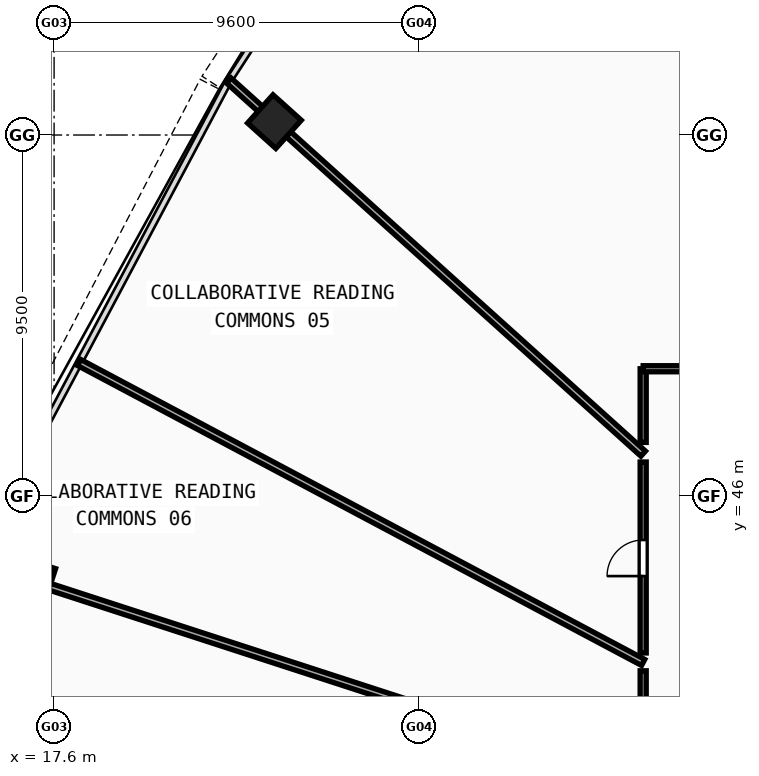
"""IFC4 building model, lengths in metres.
Left out: names, types, materials, properties, quantities, classifications, styles, units other than length and angle.
Written with IfcOpenShell. Run it as: python <this file> out.ifc"""

import sys

from ifc_helpers import new_model, si_unit, direction, frame, frame_2d, origin, origin_with_axes, origin_2d, place, context, subcontext, project, spatial, rectangle, hollow_rectangle, extrude, source, transform, mapped, element, fill, save


model = new_model("IFC4")
c1 = context("Model", 3, precision=1e-05, world=origin(), true_north=direction((0.0, 1.0)))
c2 = subcontext(c1, "Body", "Model", "MODEL_VIEW")
j1 = project(units=[si_unit("LENGTHUNIT", "METRE"), si_unit("PLANEANGLEUNIT", "RADIAN")], contexts=[c1])
p1 = place(None, origin())
s1 = spatial("IfcSite", under=j1, at=p1, CompositionType="ELEMENT")
p2 = place(p1, origin())
s2 = spatial("IfcBuilding", under=s1, at=p2, CompositionType="ELEMENT")
p3 = place(p2, frame((0.0, 0.0, 103.98)))
s3 = spatial("IfcBuildingStorey", under=s2, at=p3, CompositionType="ELEMENT", Elevation=103.98)
m1 = source(origin(), c2, "Body", "SweptSolid", [
    extrude(hollow_rectangle(XDim=1.0, YDim=1.0, WallThickness=0.042, at=origin_2d()), origin(), (0.0, 0.0, 1.0), 3.8),
])
for number, where, z_axis, x_axis in (
    (1, (23.397, 55.852, -0.26), (0.0, 0.0, 1.0), (-0.669, -0.743, 0.0)),
    (2, (17.009, 43.77, -0.26), (0.0, 0.0, 1.0), (-0.309, -0.951, 0.0)),
):
    element("IfcColumn", number, at=place(p3, frame(where, z_axis=z_axis, x_axis=x_axis)), inside=s3, PredefinedType="COLUMN", context=c2, shape_type="MappedRepresentation", body=[
        mapped(m1, transform((0.0, 0.0, 0.0), scale=1.0)),
    ])
p4 = place(p3, frame((33.1, 47.116, 0.0), z_axis=(0.0, 0.0, 1.0), x_axis=(-0.7431435128, 0.669132064232, 0.0)))
e3 = element("IfcWall", 3, at=p4, inside=s3, PredefinedType="PARTITIONING", context=c2, shape_type="SweptSolid", body=[
    extrude(rectangle(XDim=14.669, YDim=0.18, at=frame_2d((7.334, 0.0))), origin(), (0.0, 0.0, 1.0), 2.84),
])
p5 = place(p3, frame((33.1, 41.623, 0.0), z_axis=(0.0, 0.0, 1.0), x_axis=(-0.88295130371, 0.469464583624, 0.0)))
e4 = element("IfcWall", 4, at=p5, inside=s3, PredefinedType="PARTITIONING", context=c2, shape_type="SweptSolid", body=[
    extrude(rectangle(XDim=16.809, YDim=0.18, at=frame_2d((8.404, 0.0))), origin(), (0.0, 0.0, 1.0), 2.84),
])
p6 = place(p3, frame((33.1, 38.541, 0.0), z_axis=(0.0, 0.0, 1.0), x_axis=(-0.951054685131, 0.309022630063, 0.0)))
e5 = element("IfcWall", 5, at=p6, inside=s3, PredefinedType="PARTITIONING", context=c2, shape_type="SweptSolid", body=[
    extrude(rectangle(XDim=18.534, YDim=0.18, at=frame_2d((9.267, 0.0))), origin(), (0.0, 0.0, 1.0), 2.84),
])
p7 = place(p3, frame((33.1, 38.773, 0.0), z_axis=(0.0, 0.0, 1.0), x_axis=(0.0, 1.0, 0.0)))
e6 = element("IfcWall", 6, at=p7, inside=s3, PredefinedType="PARTITIONING", context=c2, shape_type="SweptSolid", body=[
    extrude(rectangle(XDim=2.63, YDim=0.16, at=frame_2d((1.315, 0.0))), origin(), (0.0, 0.0, 1.0), 3.54),
])
p8 = place(p7, frame((0.834, 0.0, 0.0)))
e7 = element("IfcOpeningElement", 7, at=p8, cuts=e6, PredefinedType="OPENING", context=c2, shape_type="SweptSolid", body=[
    extrude(rectangle(XDim=0.95, YDim=2.1, at=frame_2d((0.475, 1.05))), frame((0.0, 0.09, 0.0), z_axis=(0.0, -1.0, 0.0), x_axis=(1.0, 0.0, 0.0)), (0.0, 0.0, 1.0), 0.18),
])
p9 = place(p3, frame((33.1, 41.872, 0.0), z_axis=(0.0, 0.0, 1.0), x_axis=(0.0, 1.0, 0.0)))
e8 = element("IfcWall", 8, at=p9, inside=s3, PredefinedType="PARTITIONING", context=c2, shape_type="SweptSolid", body=[
    extrude(rectangle(XDim=5.025, YDim=0.16, at=frame_2d((2.512, 0.0))), origin(), (0.0, 0.0, 1.0), 2.84),
])
p10 = place(p9, frame((2.023, 0.0, 0.0)))
e9 = element("IfcOpeningElement", 9, at=p10, cuts=e8, PredefinedType="OPENING", context=c2, shape_type="SweptSolid", body=[
    extrude(rectangle(XDim=0.95, YDim=2.1, at=frame_2d((0.475, 1.05))), frame((0.0, 0.09, 0.0), z_axis=(0.0, -1.0, 0.0), x_axis=(1.0, 0.0, 0.0)), (0.0, 0.0, 1.0), 0.18),
])
p11 = place(p3, frame((33.1, 47.412, 0.0), z_axis=(0.0, 0.0, 1.0), x_axis=(0.0, 1.0, 0.0)))
e10 = element("IfcWall", 10, at=p11, inside=s3, PredefinedType="PARTITIONING", context=c2, shape_type="SweptSolid", body=[
    extrude(rectangle(XDim=1.938, YDim=0.16, at=frame_2d((0.969, 0.0))), origin(), (0.0, 0.0, 1.0), 3.54),
])
p12 = place(p3, frame((33.1, 49.35, 0.0), z_axis=(0.0, 0.0, 1.0), x_axis=(1.0, 0.0, 0.0)))
e11 = element("IfcWall", 11, at=p12, inside=s3, PredefinedType="PARTITIONING", context=c2, shape_type="SweptSolid", body=[
    extrude(rectangle(XDim=10.85, YDim=0.16, at=frame_2d((5.425, 0.0))), origin(), (0.0, 0.0, 1.0), 2.84),
])
p13 = place(p12, frame((4.95, 0.0, 0.0)))
e12 = element("IfcOpeningElement", 12, at=p13, cuts=e11, PredefinedType="OPENING", context=c2, shape_type="SweptSolid", body=[
    extrude(rectangle(XDim=0.95, YDim=2.1, at=frame_2d((0.475, 1.05))), frame((0.0, 0.09, 0.0), z_axis=(0.0, -1.0, 0.0), x_axis=(1.0, 0.0, 0.0)), (0.0, 0.0, 1.0), 0.18),
])
m2 = source(origin(), c2, "Body", "SweptSolid", [
    extrude(rectangle(XDim=0.95, YDim=2.1, at=frame_2d((0.475, 1.05))), frame((0.0, 0.025, 0.0), z_axis=(0.0, -1.0, 0.0), x_axis=(1.0, 0.0, 0.0)), (0.0, 0.0, 1.0), 0.05),
])
p14 = place(p10, origin_with_axes())
e13 = element("IfcDoor", 13, at=p14, inside=s3, OperationType="SINGLE_SWING_LEFT", PredefinedType="DOOR", context=c2, shape_type="MappedRepresentation", body=[
    mapped(m2, transform((0.0, 0.0, 0.0), scale=1.0)),
])
fill(e9, e13)
save(model, sys.argv[1])
